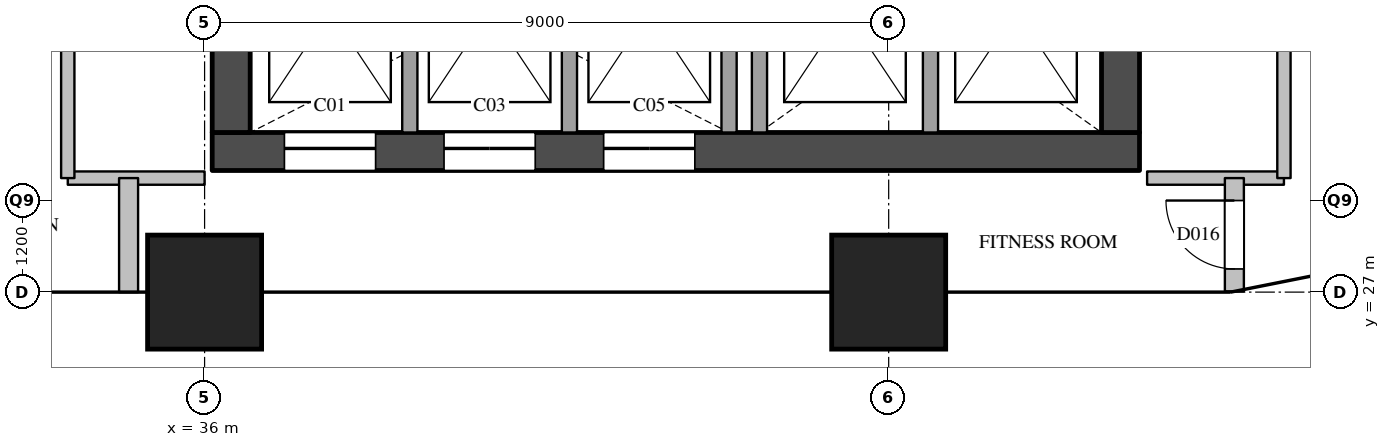
"""IFC4 building model, lengths in metres.
Left out: names, types, materials, properties, quantities, classifications, styles, units other than length and angle.
Written with IfcOpenShell. Run it as: python <this file> out.ifc"""

import sys

from ifc_helpers import new_model, si_unit, direction, frame, frame_2d, origin, origin_2d, place, context, subcontext, project, spatial, rectangle, extrude, element, fill, save


model = new_model("IFC4")
c1 = context("Model", 3, precision=1e-05, world=origin(), true_north=direction((0.0, 1.0)))
c2 = subcontext(c1, "Body", "Model", "MODEL_VIEW")
j1 = project(units=[si_unit("LENGTHUNIT", "METRE"), si_unit("PLANEANGLEUNIT", "RADIAN")], contexts=[c1])
p1 = place(None, origin())
s1 = spatial("IfcSite", under=j1, at=p1, CompositionType="ELEMENT")
p2 = place(p1, origin())
s2 = spatial("IfcBuilding", under=s1, at=p2, CompositionType="ELEMENT")
p3 = place(p2, frame((0.0, 0.0, 170.0)))
s3 = spatial("IfcBuildingStorey", under=s2, at=p3, CompositionType="ELEMENT", Elevation=170.0)
for number, where, z_axis, x_axis in (
    (1, (36.0, 27.0, 0.0), (0.0, 0.0, 1.0), (1.0, 0.0, 0.0)),
    (2, (45.0, 27.0, 0.0), (0.0, 0.0, 1.0), (1.0, 0.0, 0.0)),
):
    element("IfcColumn", number, at=place(p3, frame(where, z_axis=z_axis, x_axis=x_axis)), inside=s3, PredefinedType="COLUMN", context=c2, shape_type="SweptSolid", body=[
        extrude(rectangle(XDim=1.5, YDim=1.5, at=origin_2d()), origin(), (0.0, 0.0, 1.0), 3.9),
    ])
p4 = place(p3, frame((36.1, 28.85, 0.0), z_axis=(0.0, 0.0, 1.0), x_axis=(1.0, 0.0, 0.0)))
e3 = element("IfcWall", 3, at=p4, inside=s3, PredefinedType="SHEAR", context=c2, shape_type="SweptSolid", body=[
    extrude(rectangle(XDim=12.2, YDim=0.5, at=frame_2d((6.1, 0.0))), origin(), (0.0, 0.0, 1.0), 3.6),
])
p5 = place(p4, frame((0.95, 0.0, 0.0)))
e4 = element("IfcOpeningElement", 4, at=p5, cuts=e3, PredefinedType="OPENING", context=c2, shape_type="SweptSolid", body=[
    extrude(rectangle(XDim=1.2, YDim=2.1, at=frame_2d((0.6, 1.05))), frame((0.0, 0.26, 0.0), z_axis=(0.0, -1.0, 0.0), x_axis=(1.0, 0.0, 0.0)), (0.0, 0.0, 1.0), 0.52),
])
p6 = place(p4, frame((3.05, 0.0, 0.0)))
e5 = element("IfcOpeningElement", 5, at=p6, cuts=e3, PredefinedType="OPENING", context=c2, shape_type="SweptSolid", body=[
    extrude(rectangle(XDim=1.2, YDim=2.1, at=frame_2d((0.6, 1.05))), frame((0.0, 0.26, 0.0), z_axis=(0.0, -1.0, 0.0), x_axis=(1.0, 0.0, 0.0)), (0.0, 0.0, 1.0), 0.52),
])
p7 = place(p4, frame((5.15, 0.0, 0.0)))
e6 = element("IfcOpeningElement", 6, at=p7, cuts=e3, PredefinedType="OPENING", context=c2, shape_type="SweptSolid", body=[
    extrude(rectangle(XDim=1.2, YDim=2.1, at=frame_2d((0.6, 1.05))), frame((0.0, 0.26, 0.0), z_axis=(0.0, -1.0, 0.0), x_axis=(1.0, 0.0, 0.0)), (0.0, 0.0, 1.0), 0.52),
])
p8 = place(p3, frame((36.35, 29.1, 0.0), z_axis=(0.0, 0.0, 1.0), x_axis=(0.0, 1.0, 0.0)))
e7 = element("IfcWall", 7, at=p8, inside=s3, PredefinedType="SHEAR", context=c2, shape_type="SweptSolid", body=[
    extrude(rectangle(XDim=20.3, YDim=0.5, at=frame_2d((10.15, 0.0))), origin(), (0.0, 0.0, 1.0), 3.6),
])
p9 = place(p8, frame((3.6, 0.0, 0.0)))
e8 = element("IfcOpeningElement", 8, at=p9, cuts=e7, PredefinedType="OPENING", context=c2, shape_type="SweptSolid", body=[
    extrude(rectangle(XDim=1.8, YDim=2.1, at=frame_2d((0.9, 1.05))), frame((0.0, 0.26, 0.0), z_axis=(0.0, -1.0, 0.0), x_axis=(1.0, 0.0, 0.0)), (0.0, 0.0, 1.0), 0.52),
])
p10 = place(p8, frame((16.4, 0.0, 0.0)))
e9 = element("IfcOpeningElement", 9, at=p10, cuts=e7, PredefinedType="OPENING", context=c2, shape_type="SweptSolid", body=[
    extrude(rectangle(XDim=1.0, YDim=2.1, at=frame_2d((0.5, 1.05))), frame((0.0, 0.26, 0.0), z_axis=(0.0, -1.0, 0.0), x_axis=(1.0, 0.0, 0.0)), (0.0, 0.0, 1.0), 0.52),
])
p11 = place(p3, frame((48.05, 29.1, 0.0), z_axis=(0.0, 0.0, 1.0), x_axis=(0.0, 1.0, 0.0)))
e10 = element("IfcWall", 10, at=p11, inside=s3, PredefinedType="SHEAR", context=c2, shape_type="SweptSolid", body=[
    extrude(rectangle(XDim=20.3, YDim=0.5, at=frame_2d((10.15, 0.0))), origin(), (0.0, 0.0, 1.0), 3.6),
])
p12 = place(p11, frame((12.5, 0.0, 0.0)))
e11 = element("IfcOpeningElement", 11, at=p12, cuts=e10, PredefinedType="OPENING", context=c2, shape_type="SweptSolid", body=[
    extrude(rectangle(XDim=0.7, YDim=2.1, at=frame_2d((0.35, 1.05))), frame((0.0, 0.26, 0.0), z_axis=(0.0, -1.0, 0.0), x_axis=(1.0, 0.0, 0.0)), (0.0, 0.0, 1.0), 0.52),
])
p13 = place(p11, frame((3.9, 0.0, 0.0)))
e12 = element("IfcOpeningElement", 12, at=p13, cuts=e10, PredefinedType="OPENING", context=c2, shape_type="SweptSolid", body=[
    extrude(rectangle(XDim=1.8, YDim=2.1, at=frame_2d((0.9, 1.05))), frame((0.0, 0.26, 0.0), z_axis=(0.0, -1.0, 0.0), x_axis=(1.0, 0.0, 0.0)), (0.0, 0.0, 1.0), 0.52),
])
for number, where, z_axis, x_axis in (
    (13, (38.7, 29.1, 0.0), (0.0, 0.0, 1.0), (0.0, 1.0, 0.0)),
    (14, (40.8, 29.1, 0.0), (0.0, 0.0, 1.0), (0.0, 1.0, 0.0)),
    (15, (42.9, 29.1, 0.0), (0.0, 0.0, 1.0), (0.0, 1.0, 0.0)),
):
    element("IfcWall", number, at=place(p3, frame(where, z_axis=z_axis, x_axis=x_axis)), inside=s3, PredefinedType="SOLIDWALL", context=c2, shape_type="SweptSolid", body=[
        extrude(rectangle(XDim=3.2, YDim=0.2, at=frame_2d((1.6, 0.0))), origin(), (0.0, 0.0, 1.0), 3.6),
    ])
p14 = place(p3, frame((43.3, 29.1, 0.0), z_axis=(0.0, 0.0, 1.0), x_axis=(0.0, 1.0, 0.0)))
e16 = element("IfcWall", 16, at=p14, inside=s3, PredefinedType="SOLIDWALL", context=c2, shape_type="SweptSolid", body=[
    extrude(rectangle(XDim=9.9, YDim=0.2, at=frame_2d((4.95, 0.0))), origin(), (0.0, 0.0, 1.0), 3.6),
])
p15 = place(p3, frame((45.55, 29.1, 0.0), z_axis=(0.0, 0.0, 1.0), x_axis=(0.0, 1.0, 0.0)))
e17 = element("IfcWall", 17, at=p15, inside=s3, PredefinedType="SOLIDWALL", context=c2, shape_type="SweptSolid", body=[
    extrude(rectangle(XDim=3.2, YDim=0.2, at=frame_2d((1.6, 0.0))), origin(), (0.0, 0.0, 1.0), 3.6),
])
for number, where, z_axis, x_axis in (
    (18, (34.2, 28.5, 0.0), (0.0, 0.0, 1.0), (1.0, 0.0, 0.0)),
    (19, (48.4, 28.5, 0.0), (0.0, 0.0, 1.0), (1.0, 0.0, 0.0)),
):
    element("IfcWall", number, at=place(p3, frame(where, z_axis=z_axis, x_axis=x_axis)), inside=s3, PredefinedType="PARTITIONING", context=c2, shape_type="SweptSolid", body=[
        extrude(rectangle(XDim=1.8, YDim=0.175, at=frame_2d((0.9, 0.0))), origin(), (0.0, 0.0, 1.0), 3.6),
    ])
p16 = place(p3, frame((34.2, 28.5, 0.0), z_axis=(0.0, 0.0, 1.0), x_axis=(0.0, 1.0, 0.0)))
e20 = element("IfcWall", 20, at=p16, inside=s3, PredefinedType="PARTITIONING", context=c2, shape_type="SweptSolid", body=[
    extrude(rectangle(XDim=23.3, YDim=0.175, at=frame_2d((11.65, 0.0))), origin(), (0.0, 0.0, 1.0), 3.6),
])
p17 = place(p16, frame((15.1, 0.0, 0.0)))
e21 = element("IfcOpeningElement", 21, at=p17, cuts=e20, PredefinedType="OPENING", context=c2, shape_type="SweptSolid", body=[
    extrude(rectangle(XDim=1.0, YDim=2.1, at=frame_2d((0.5, 1.05))), frame((0.0, 0.097, 0.0), z_axis=(0.0, -1.0, 0.0), x_axis=(1.0, 0.0, 0.0)), (0.0, 0.0, 1.0), 0.195),
])
p18 = place(p3, frame((50.2, 28.5, 0.0), z_axis=(0.0, 0.0, 1.0), x_axis=(0.0, 1.0, 0.0)))
e22 = element("IfcWall", 22, at=p18, inside=s3, PredefinedType="PARTITIONING", context=c2, shape_type="SweptSolid", body=[
    extrude(rectangle(XDim=23.3, YDim=0.175, at=frame_2d((11.65, 0.0))), origin(), (0.0, 0.0, 1.0), 3.6),
])
p19 = place(p18, frame((7.8, 0.0, 0.0)))
e23 = element("IfcOpeningElement", 23, at=p19, cuts=e22, PredefinedType="OPENING", context=c2, shape_type="SweptSolid", body=[
    extrude(rectangle(XDim=0.9, YDim=2.1, at=frame_2d((0.45, 1.05))), frame((0.0, 0.097, 0.0), z_axis=(0.0, -1.0, 0.0), x_axis=(1.0, 0.0, 0.0)), (0.0, 0.0, 1.0), 0.195),
])
p20 = place(p18, frame((19.4, 0.0, 0.0)))
e24 = element("IfcOpeningElement", 24, at=p20, cuts=e22, PredefinedType="OPENING", context=c2, shape_type="SweptSolid", body=[
    extrude(rectangle(XDim=1.0, YDim=2.1, at=frame_2d((0.5, 1.05))), frame((0.0, 0.097, 0.0), z_axis=(0.0, -1.0, 0.0), x_axis=(1.0, 0.0, 0.0)), (0.0, 0.0, 1.0), 0.195),
])
p21 = place(p3, frame((35.0, 27.0, 0.0), z_axis=(0.0, 0.0, 1.0), x_axis=(0.0, 1.0, 0.0)))
e25 = element("IfcWall", 25, at=p21, inside=s3, PredefinedType="PARTITIONING", context=c2, shape_type="SweptSolid", body=[
    extrude(rectangle(XDim=1.5, YDim=0.25, at=frame_2d((0.75, 0.0))), origin(), (0.0, 0.0, 1.0), 2.6),
])
p22 = place(p3, frame((49.548, 27.01, 0.0), z_axis=(0.0, 0.0, 1.0), x_axis=(0.0, 1.0, 0.0)))
e26 = element("IfcWall", 26, at=p22, inside=s3, PredefinedType="PARTITIONING", context=c2, shape_type="SweptSolid", body=[
    extrude(rectangle(XDim=1.49, YDim=0.25, at=frame_2d((0.745, 0.0))), origin(), (0.0, 0.0, 1.0), 2.6),
])
p23 = place(p22, frame((0.295, 0.0, 0.0)))
e27 = element("IfcOpeningElement", 27, at=p23, cuts=e26, PredefinedType="OPENING", context=c2, shape_type="SweptSolid", body=[
    extrude(rectangle(XDim=0.9, YDim=2.1, at=frame_2d((0.45, 1.05))), frame((0.0, 0.135, 0.0), z_axis=(0.0, -1.0, 0.0), x_axis=(1.0, 0.0, 0.0)), (0.0, 0.0, 1.0), 0.27),
])
p24 = place(p5, origin())
e28 = element("IfcDoor", 28, at=p24, inside=s3, OperationType="SLIDING_TO_LEFT", PredefinedType="DOOR", context=c2, shape_type="SweptSolid", body=[
    extrude(rectangle(XDim=1.2, YDim=2.1, at=frame_2d((0.6, 1.05))), frame((0.0, 0.025, 0.0), z_axis=(0.0, -1.0, 0.0), x_axis=(1.0, 0.0, 0.0)), (0.0, 0.0, 1.0), 0.05),
])
fill(e4, e28)
p25 = place(p6, origin())
e29 = element("IfcDoor", 29, at=p25, inside=s3, OperationType="SLIDING_TO_LEFT", PredefinedType="DOOR", context=c2, shape_type="SweptSolid", body=[
    extrude(rectangle(XDim=1.2, YDim=2.1, at=frame_2d((0.6, 1.05))), frame((0.0, 0.025, 0.0), z_axis=(0.0, -1.0, 0.0), x_axis=(1.0, 0.0, 0.0)), (0.0, 0.0, 1.0), 0.05),
])
fill(e5, e29)
p26 = place(p7, origin())
e30 = element("IfcDoor", 30, at=p26, inside=s3, OperationType="SLIDING_TO_LEFT", PredefinedType="DOOR", context=c2, shape_type="SweptSolid", body=[
    extrude(rectangle(XDim=1.2, YDim=2.1, at=frame_2d((0.6, 1.05))), frame((0.0, 0.025, 0.0), z_axis=(0.0, -1.0, 0.0), x_axis=(1.0, 0.0, 0.0)), (0.0, 0.0, 1.0), 0.05),
])
fill(e6, e30)
p27 = place(p23, origin())
e31 = element("IfcDoor", 31, at=p27, inside=s3, OperationType="SINGLE_SWING_RIGHT", PredefinedType="DOOR", context=c2, shape_type="SweptSolid", body=[
    extrude(rectangle(XDim=0.9, YDim=2.1, at=frame_2d((0.45, 1.05))), frame((0.0, 0.025, 0.0), z_axis=(0.0, -1.0, 0.0), x_axis=(1.0, 0.0, 0.0)), (0.0, 0.0, 1.0), 0.05),
])
fill(e27, e31)
save(model, sys.argv[1])
